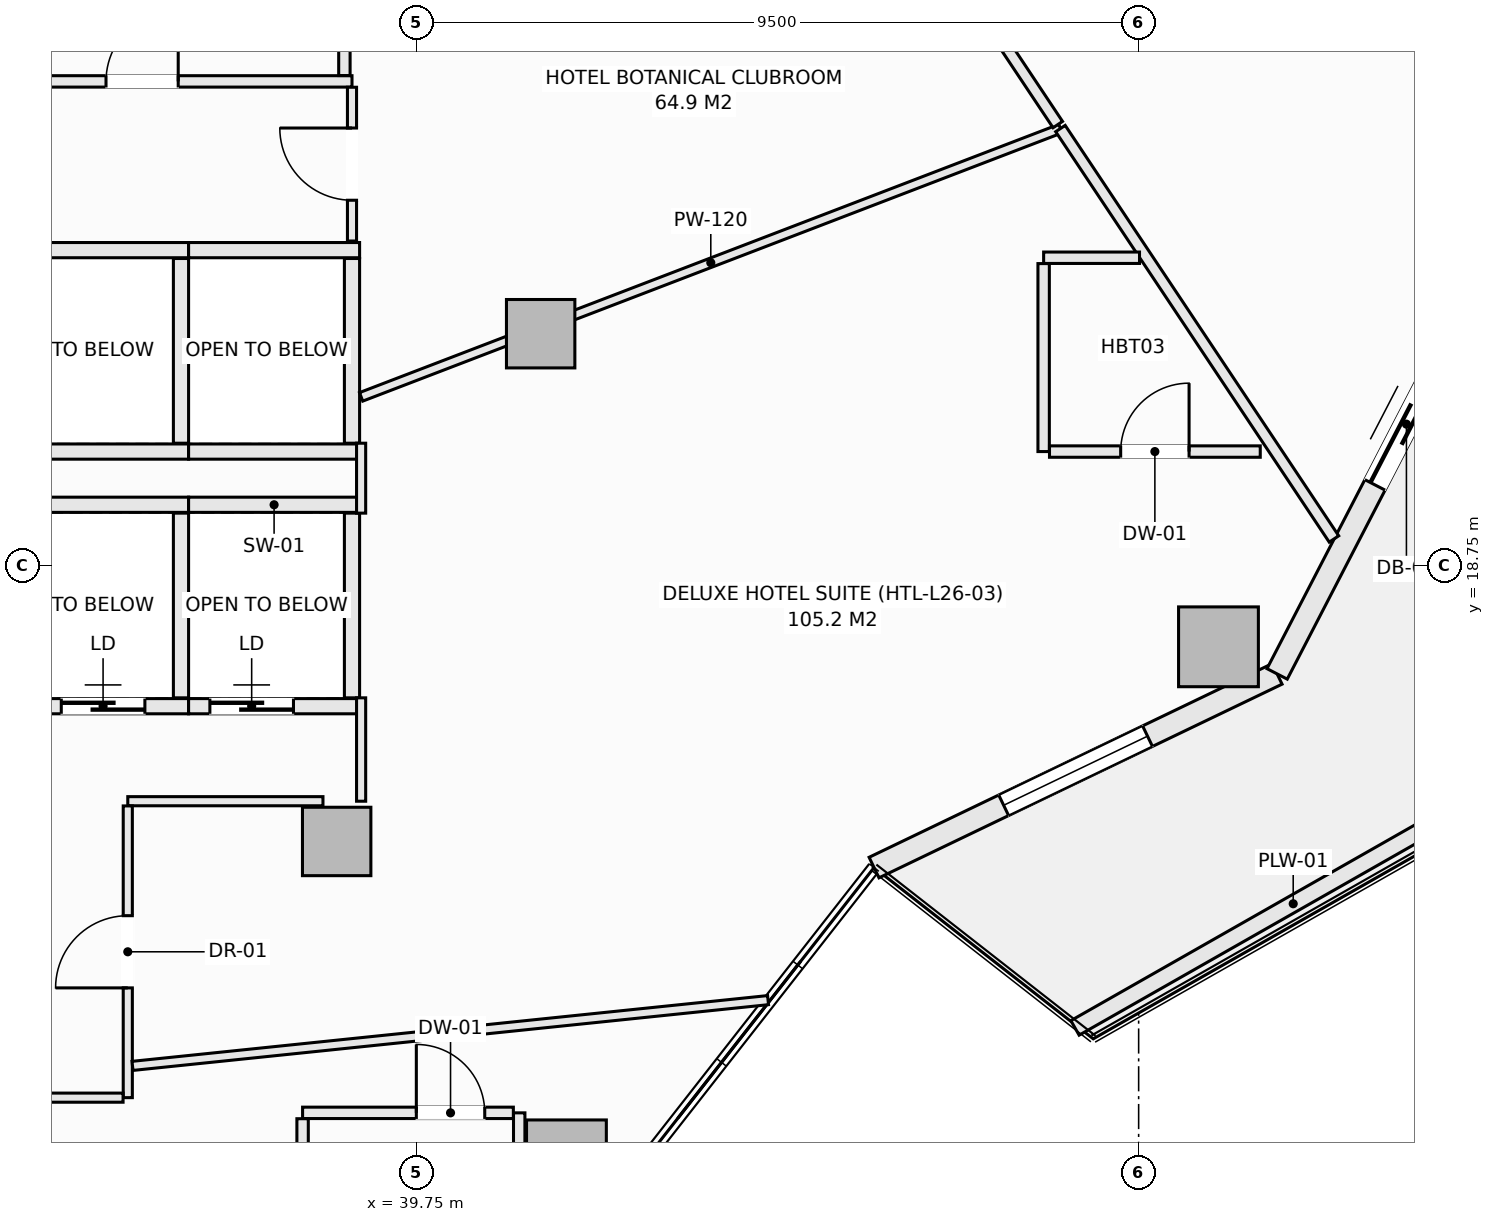
"""IFC4 building model, lengths in metres.
Left out: names, types, materials, properties, quantities, classifications, styles, units other than length and angle.
Written with IfcOpenShell. Run it as: python <this file> out.ifc"""

import sys

from ifc_helpers import new_model, si_unit, direction, frame, frame_2d, origin, origin_2d, place, context, subcontext, project, spatial, rectangle, extrude, element, fill, save


model = new_model("IFC4")
c1 = context("Model", 3, precision=1e-05, world=origin(), true_north=direction((0.0, 1.0)))
c2 = subcontext(c1, "Body", "Model", "MODEL_VIEW")
j1 = project(units=[si_unit("LENGTHUNIT", "METRE"), si_unit("PLANEANGLEUNIT", "RADIAN")], contexts=[c1])
p1 = place(None, origin())
s1 = spatial("IfcSite", under=j1, at=p1, CompositionType="ELEMENT")
p2 = place(p1, origin())
s2 = spatial("IfcBuilding", under=s1, at=p2, CompositionType="ELEMENT")
p3 = place(p2, frame((0.0, 0.0, 108.7)))
s3 = spatial("IfcBuildingStorey", under=s2, at=p3, CompositionType="ELEMENT", Elevation=108.7)
for number, where, z_axis, x_axis in (
    (1, (41.721, 10.932, -0.27), (0.0, 0.0, 1.0), (1.0, 0.0, 0.0)),
    (2, (50.3, 17.681, -0.27), (0.0, 0.0, 1.0), (1.0, 0.0, 0.0)),
):
    element("IfcColumn", number, at=place(p3, frame(where, z_axis=z_axis, x_axis=x_axis)), inside=s3, PredefinedType="COLUMN", context=c2, shape_type="SweptSolid", body=[
        extrude(rectangle(XDim=1.05, YDim=1.05, at=origin_2d()), origin(), (0.0, 0.0, 1.0), 3.4),
    ])
for number, where, z_axis, x_axis in (
    (3, (38.698, 15.121, -0.27), (0.0, 0.0, 1.0), (1.0, 0.0, 0.0)),
    (4, (41.382, 21.801, -0.27), (0.0, 0.0, 1.0), (1.0, 0.0, 0.0)),
):
    element("IfcColumn", number, at=place(p3, frame(where, z_axis=z_axis, x_axis=x_axis)), inside=s3, PredefinedType="COLUMN", context=c2, shape_type="SweptSolid", body=[
        extrude(rectangle(XDim=0.9, YDim=0.9, at=origin_2d()), origin(), (0.0, 0.0, 1.0), 3.4),
    ])
p4 = place(p3, frame((45.769, 14.777, 0.0), z_axis=(0.0, 0.0, 1.0), x_axis=(0.901370184739, 0.433049408339, 0.0)))
e5 = element("IfcWall", 5, at=p4, inside=s3, PredefinedType="SOLIDWALL", context=c2, shape_type="SweptSolid", body=[
    extrude(rectangle(XDim=5.884, YDim=0.3, at=frame_2d((2.942, 0.0))), origin(), (0.0, 0.0, 1.0), 2.653),
])
p5 = place(p4, frame((1.892, 0.0, 0.74)))
e6 = element("IfcOpeningElement", 6, at=p5, cuts=e5, PredefinedType="OPENING", context=c2, shape_type="SweptSolid", body=[
    extrude(rectangle(XDim=2.1, YDim=1.7, at=frame_2d((1.05, 0.85))), frame((0.0, 0.16, 0.0), z_axis=(0.0, -1.0, 0.0), x_axis=(1.0, 0.0, 0.0)), (0.0, 0.0, 1.0), 0.32),
])
p6 = place(p3, frame((51.072, 17.325, 0.0), z_axis=(0.0, 0.0, 1.0), x_axis=(0.459767899643, 0.888039119892, 0.0)))
e7 = element("IfcWall", 7, at=p6, inside=s3, PredefinedType="SOLIDWALL", context=c2, shape_type="SweptSolid", body=[
    extrude(rectangle(XDim=5.255, YDim=0.3, at=frame_2d((2.628, 0.0))), origin(), (0.0, 0.0, 1.0), 2.653),
])
p7 = place(p6, frame((2.8, 0.0, 0.0)))
e8 = element("IfcOpeningElement", 8, at=p7, cuts=e7, PredefinedType="OPENING", context=c2, shape_type="SweptSolid", body=[
    extrude(rectangle(XDim=1.8, YDim=2.25, at=frame_2d((0.9, 1.125))), frame((0.0, 0.16, 0.0), z_axis=(0.0, -1.0, 0.0), x_axis=(1.0, 0.0, 0.0)), (0.0, 0.0, 1.0), 0.32),
])
p8 = place(p3, frame((48.413, 12.668, 0.0), z_axis=(0.0, 0.0, 1.0), x_axis=(0.869187658335, 0.494482370361, 0.0)))
e9 = element("IfcWall", 9, at=p8, inside=s3, PredefinedType="PARAPET", context=c2, shape_type="SweptSolid", body=[
    extrude(rectangle(XDim=6.606, YDim=0.22, at=frame_2d((3.303, 0.0))), origin(), (0.0, 0.0, 1.0), 0.52),
])
p9 = place(p3, frame((34.5, 19.55, 0.0), z_axis=(0.0, 0.0, 1.0), x_axis=(1.0, 0.0, 0.0)))
e10 = element("IfcWall", 10, at=p9, inside=s3, PredefinedType="SOLIDWALL", context=c2, shape_type="SweptSolid", body=[
    extrude(rectangle(XDim=2.25, YDim=0.2, at=frame_2d((1.125, 0.0))), origin(), (0.0, 0.0, 1.0), 3.13),
])
p10 = place(p3, frame((34.5, 16.9, 0.0), z_axis=(0.0, 0.0, 1.0), x_axis=(1.0, 0.0, 0.0)))
e11 = element("IfcWall", 11, at=p10, inside=s3, PredefinedType="SOLIDWALL", context=c2, shape_type="SweptSolid", body=[
    extrude(rectangle(XDim=2.25, YDim=0.2, at=frame_2d((1.125, 0.0))), origin(), (0.0, 0.0, 1.0), 3.13),
])
p11 = place(p10, frame((0.575, 0.0, 0.0)))
e12 = element("IfcOpeningElement", 12, at=p11, cuts=e11, PredefinedType="OPENING", context=c2, shape_type="SweptSolid", body=[
    extrude(rectangle(XDim=1.1, YDim=2.2, at=frame_2d((0.55, 1.1))), frame((0.0, 0.11, 0.0), z_axis=(0.0, -1.0, 0.0), x_axis=(1.0, 0.0, 0.0)), (0.0, 0.0, 1.0), 0.22),
])
p12 = place(p3, frame((36.65, 17.01, 0.0), z_axis=(0.0, 0.0, 1.0), x_axis=(0.0, 1.0, 0.0)))
e13 = element("IfcWall", 13, at=p12, inside=s3, PredefinedType="SOLIDWALL", context=c2, shape_type="SweptSolid", body=[
    extrude(rectangle(XDim=2.43, YDim=0.2, at=frame_2d((1.215, 0.0))), origin(), (0.0, 0.0, 1.0), 3.13),
])
p13 = place(p3, frame((36.75, 19.55, 0.0), z_axis=(0.0, 0.0, 1.0), x_axis=(1.0, 0.0, 0.0)))
e14 = element("IfcWall", 14, at=p13, inside=s3, PredefinedType="SOLIDWALL", context=c2, shape_type="SweptSolid", body=[
    extrude(rectangle(XDim=2.25, YDim=0.2, at=frame_2d((1.125, 0.0))), origin(), (0.0, 0.0, 1.0), 3.13),
])
p14 = place(p3, frame((36.75, 16.9, 0.0), z_axis=(0.0, 0.0, 1.0), x_axis=(1.0, 0.0, 0.0)))
e15 = element("IfcWall", 15, at=p14, inside=s3, PredefinedType="SOLIDWALL", context=c2, shape_type="SweptSolid", body=[
    extrude(rectangle(XDim=2.25, YDim=0.2, at=frame_2d((1.125, 0.0))), origin(), (0.0, 0.0, 1.0), 3.13),
])
p15 = place(p14, frame((0.28, 0.0, 0.0)))
e16 = element("IfcOpeningElement", 16, at=p15, cuts=e15, PredefinedType="OPENING", context=c2, shape_type="SweptSolid", body=[
    extrude(rectangle(XDim=1.1, YDim=2.2, at=frame_2d((0.55, 1.1))), frame((0.0, 0.11, 0.0), z_axis=(0.0, -1.0, 0.0), x_axis=(1.0, 0.0, 0.0)), (0.0, 0.0, 1.0), 0.22),
])
p16 = place(p3, frame((38.9, 17.01, 0.0), z_axis=(0.0, 0.0, 1.0), x_axis=(0.0, 1.0, 0.0)))
e17 = element("IfcWall", 17, at=p16, inside=s3, PredefinedType="SOLIDWALL", context=c2, shape_type="SweptSolid", body=[
    extrude(rectangle(XDim=2.43, YDim=0.2, at=frame_2d((1.215, 0.0))), origin(), (0.0, 0.0, 1.0), 3.13),
])
for number, where, z_axis, x_axis in (
    (18, (34.5, 22.9, 0.0), (0.0, 0.0, 1.0), (1.0, 0.0, 0.0)),
    (19, (34.5, 20.25, 0.0), (0.0, 0.0, 1.0), (1.0, 0.0, 0.0)),
):
    element("IfcWall", number, at=place(p3, frame(where, z_axis=z_axis, x_axis=x_axis)), inside=s3, PredefinedType="SOLIDWALL", context=c2, shape_type="SweptSolid", body=[
        extrude(rectangle(XDim=2.25, YDim=0.2, at=frame_2d((1.125, 0.0))), origin(), (0.0, 0.0, 1.0), 3.13),
    ])
p17 = place(p3, frame((36.65, 20.36, 0.0), z_axis=(0.0, 0.0, 1.0), x_axis=(0.0, 1.0, 0.0)))
e20 = element("IfcWall", 20, at=p17, inside=s3, PredefinedType="SOLIDWALL", context=c2, shape_type="SweptSolid", body=[
    extrude(rectangle(XDim=2.43, YDim=0.2, at=frame_2d((1.215, 0.0))), origin(), (0.0, 0.0, 1.0), 3.13),
])
for number, where, z_axis, x_axis in (
    (21, (36.75, 22.9, 0.0), (0.0, 0.0, 1.0), (1.0, 0.0, 0.0)),
    (22, (36.75, 20.25, 0.0), (0.0, 0.0, 1.0), (1.0, 0.0, 0.0)),
):
    element("IfcWall", number, at=place(p3, frame(where, z_axis=z_axis, x_axis=x_axis)), inside=s3, PredefinedType="SOLIDWALL", context=c2, shape_type="SweptSolid", body=[
        extrude(rectangle(XDim=2.25, YDim=0.2, at=frame_2d((1.125, 0.0))), origin(), (0.0, 0.0, 1.0), 3.13),
    ])
p18 = place(p3, frame((38.9, 20.36, 0.0), z_axis=(0.0, 0.0, 1.0), x_axis=(0.0, 1.0, 0.0)))
e23 = element("IfcWall", 23, at=p18, inside=s3, PredefinedType="SOLIDWALL", context=c2, shape_type="SweptSolid", body=[
    extrude(rectangle(XDim=2.43, YDim=0.2, at=frame_2d((1.215, 0.0))), origin(), (0.0, 0.0, 1.0), 3.13),
])
p19 = place(p3, frame((33.377, 25.12, 0.0), z_axis=(0.0, 0.0, 1.0), x_axis=(1.0, 0.0, 0.0)))
e24 = element("IfcWall", 24, at=p19, inside=s3, PredefinedType="PARTITIONING", context=c2, shape_type="SweptSolid", body=[
    extrude(rectangle(XDim=5.523, YDim=0.15, at=frame_2d((2.761, 0.0))), origin(), (0.0, 0.0, 1.0), 3.13),
])
p20 = place(p19, frame((2.287, 0.0, 0.0)))
e25 = element("IfcOpeningElement", 25, at=p20, cuts=e24, PredefinedType="OPENING", context=c2, shape_type="SweptSolid", body=[
    extrude(rectangle(XDim=0.95, YDim=2.1, at=frame_2d((0.475, 1.05))), frame((0.0, 0.085, 0.0), z_axis=(0.0, -1.0, 0.0), x_axis=(1.0, 0.0, 0.0)), (0.0, 0.0, 1.0), 0.17),
])
p21 = place(p3, frame((38.8, 25.197, 0.0), z_axis=(0.0, 0.0, 1.0), x_axis=(0.0, 1.0, 0.0)))
e26 = element("IfcWall", 26, at=p21, inside=s3, PredefinedType="PARTITIONING", context=c2, shape_type="SweptSolid", body=[
    extrude(rectangle(XDim=1.946, YDim=0.15, at=frame_2d((0.973, 0.0))), origin(), (0.0, 0.0, 1.0), 3.13),
])
p22 = place(p3, frame((39.02, 15.65, 0.0), z_axis=(0.0, 0.0, 1.0), x_axis=(0.0, 1.0, 0.0)))
e27 = element("IfcWall", 27, at=p22, inside=s3, PredefinedType="PARTITIONING", context=c2, shape_type="SweptSolid", body=[
    extrude(rectangle(XDim=1.36, YDim=0.12, at=frame_2d((0.68, 0.0))), origin(), (0.0, 0.0, 1.0), 2.505),
])
p23 = place(p3, frame((39.02, 19.44, 0.0), z_axis=(0.0, 0.0, 1.0), x_axis=(0.0, 1.0, 0.0)))
e28 = element("IfcWall", 28, at=p23, inside=s3, PredefinedType="PARTITIONING", context=c2, shape_type="SweptSolid", body=[
    extrude(rectangle(XDim=0.92, YDim=0.12, at=frame_2d((0.46, 0.0))), origin(), (0.0, 0.0, 1.0), 3.13),
])
p24 = place(p3, frame((35.95, 15.65, 0.0), z_axis=(0.0, 0.0, 1.0), x_axis=(1.0, 0.0, 0.0)))
e29 = element("IfcWall", 29, at=p24, inside=s3, PredefinedType="PARTITIONING", context=c2, shape_type="SweptSolid", body=[
    extrude(rectangle(XDim=2.568, YDim=0.12, at=frame_2d((1.284, 0.0))), origin(), (0.0, 0.0, 1.0), 3.13),
])
p25 = place(p3, frame((35.95, 11.75, 0.0), z_axis=(0.0, 0.0, 1.0), x_axis=(0.0, 1.0, 0.0)))
e30 = element("IfcWall", 30, at=p25, inside=s3, PredefinedType="PARTITIONING", context=c2, shape_type="SweptSolid", body=[
    extrude(rectangle(XDim=3.838, YDim=0.12, at=frame_2d((1.919, 0.0))), origin(), (0.0, 0.0, 1.0), 3.13),
])
p26 = place(p25, frame((1.444, 0.0, 0.0)))
e31 = element("IfcOpeningElement", 31, at=p26, cuts=e30, PredefinedType="OPENING", context=c2, shape_type="SweptSolid", body=[
    extrude(rectangle(XDim=0.95, YDim=2.1, at=frame_2d((0.475, 1.05))), frame((0.0, 0.07, 0.0), z_axis=(0.0, -1.0, 0.0), x_axis=(1.0, 0.0, 0.0)), (0.0, 0.0, 1.0), 0.14),
])
p27 = place(p3, frame((27.212, 11.75, 0.0), z_axis=(0.0, 0.0, 1.0), x_axis=(1.0, 0.0, 0.0)))
e32 = element("IfcWall", 32, at=p27, inside=s3, PredefinedType="PARTITIONING", context=c2, shape_type="SweptSolid", body=[
    extrude(rectangle(XDim=8.676, YDim=0.12, at=frame_2d((4.338, 0.0))), origin(), (0.0, 0.0, 1.0), 3.13),
])
p28 = place(p27, frame((4.993, 0.0, 0.0)))
e33 = element("IfcOpeningElement", 33, at=p28, cuts=e32, PredefinedType="OPENING", context=c2, shape_type="SweptSolid", body=[
    extrude(rectangle(XDim=0.95, YDim=2.1, at=frame_2d((0.475, 1.05))), frame((0.0, 0.07, 0.0), z_axis=(0.0, -1.0, 0.0), x_axis=(1.0, 0.0, 0.0)), (0.0, 0.0, 1.0), 0.14),
])
p29 = place(p3, frame((38.9, 23.02, 0.0), z_axis=(0.0, 0.0, 1.0), x_axis=(0.0, 1.0, 0.0)))
e34 = element("IfcWall", 34, at=p29, inside=s3, PredefinedType="PARTITIONING", context=c2, shape_type="SweptSolid", body=[
    extrude(rectangle(XDim=2.023, YDim=0.12, at=frame_2d((1.011, 0.0))), origin(), (0.0, 0.0, 1.0), 3.13),
])
p30 = place(p29, frame((0.537, 0.0, 0.0)))
e35 = element("IfcOpeningElement", 35, at=p30, cuts=e34, PredefinedType="OPENING", context=c2, shape_type="SweptSolid", body=[
    extrude(rectangle(XDim=0.95, YDim=2.1, at=frame_2d((0.475, 1.05))), frame((0.0, 0.07, 0.0), z_axis=(0.0, -1.0, 0.0), x_axis=(1.0, 0.0, 0.0)), (0.0, 0.0, 1.0), 0.14),
])
p31 = place(p3, frame((39.02, 20.97, 0.0), z_axis=(0.0, 0.0, 1.0), x_axis=(0.933683590648, 0.358099082035, 0.0)))
e36 = element("IfcWall", 36, at=p31, inside=s3, PredefinedType="PARTITIONING", context=c2, shape_type="SweptSolid", body=[
    extrude(rectangle(XDim=9.855, YDim=0.12, at=frame_2d((4.927, 0.0))), origin(), (0.0, 0.0, 1.0), 2.812),
])
p32 = place(p3, frame((36.012, 12.168, 0.0), z_axis=(0.0, 0.0, 1.0), x_axis=(0.994692716247, 0.102890233962, 0.0)))
e37 = element("IfcWall", 37, at=p32, inside=s3, PredefinedType="PARTITIONING", context=c2, shape_type="SweptSolid", body=[
    extrude(rectangle(XDim=8.407, YDim=0.12, at=frame_2d((4.204, 0.0))), origin(), (0.0, 0.0, 1.0), 2.653),
])
p33 = place(p3, frame((41.1, 10.032, 0.0), z_axis=(0.0, 0.0, 1.0), x_axis=(0.0, 1.0, 0.0)))
e38 = element("IfcWall", 38, at=p33, inside=s3, PredefinedType="PARTITIONING", context=c2, shape_type="SweptSolid", body=[
    extrude(rectangle(XDim=1.518, YDim=0.15, at=frame_2d((0.759, 0.0))), origin(), (0.0, 0.0, 1.0), 2.505),
])
p34 = place(p3, frame((38.25, 11.55, 0.0), z_axis=(0.0, 0.0, 1.0), x_axis=(1.0, 0.0, 0.0)))
e39 = element("IfcWall", 39, at=p34, inside=s3, PredefinedType="PARTITIONING", context=c2, shape_type="SweptSolid", body=[
    extrude(rectangle(XDim=2.773, YDim=0.15, at=frame_2d((1.386, 0.0))), origin(), (0.0, 0.0, 1.0), 3.13),
])
p35 = place(p34, frame((1.497, 0.0, 0.0)))
e40 = element("IfcOpeningElement", 40, at=p35, cuts=e39, PredefinedType="OPENING", context=c2, shape_type="SweptSolid", body=[
    extrude(rectangle(XDim=0.9, YDim=2.1, at=frame_2d((0.45, 1.05))), frame((0.0, 0.085, 0.0), z_axis=(0.0, -1.0, 0.0), x_axis=(1.0, 0.0, 0.0)), (0.0, 0.0, 1.0), 0.17),
])
p36 = place(p3, frame((38.25, 9.087, 0.0), z_axis=(0.0, 0.0, 1.0), x_axis=(0.0, 1.0, 0.0)))
e41 = element("IfcWall", 41, at=p36, inside=s3, PredefinedType="PARTITIONING", context=c2, shape_type="SweptSolid", body=[
    extrude(rectangle(XDim=2.385, YDim=0.15, at=frame_2d((1.193, 0.0))), origin(), (0.0, 0.0, 1.0), 3.13),
])
p37 = place(p3, frame((37.565, 40.488, 0.0), z_axis=(0.0, 0.0, 1.0), x_axis=(0.554585457046, -0.832126775698, 0.0)))
e42 = element("IfcWall", 42, at=p37, inside=s3, PredefinedType="PARTITIONING", context=c2, shape_type="SweptSolid", body=[
    extrude(rectangle(XDim=19.151, YDim=0.15, at=frame_2d((9.575, 0.0))), origin(), (0.0, 0.0, 1.0), 3.13),
])
p38 = place(p3, frame((48.221, 24.5, 0.0), z_axis=(0.0, 0.0, 1.0), x_axis=(0.554587324832, -0.832125530876, 0.0)))
e43 = element("IfcWall", 43, at=p38, inside=s3, PredefinedType="PARTITIONING", context=c2, shape_type="SweptSolid", body=[
    extrude(rectangle(XDim=6.489, YDim=0.15, at=frame_2d((3.245, 0.0))), origin(), (0.0, 0.0, 1.0), 3.13),
])
p39 = place(p3, frame((48.0, 22.8, 0.0), z_axis=(0.0, 0.0, 1.0), x_axis=(1.0, 0.0, 0.0)))
e44 = element("IfcWall", 44, at=p39, inside=s3, PredefinedType="PARTITIONING", context=c2, shape_type="SweptSolid", body=[
    extrude(rectangle(XDim=1.261, YDim=0.15, at=frame_2d((0.631, 0.0))), origin(), (0.0, 0.0, 1.0), 2.812),
])
p40 = place(p3, frame((48.0, 20.25, 0.0), z_axis=(0.0, 0.0, 1.0), x_axis=(0.0, 1.0, 0.0)))
e45 = element("IfcWall", 45, at=p40, inside=s3, PredefinedType="PARTITIONING", context=c2, shape_type="SweptSolid", body=[
    extrude(rectangle(XDim=2.473, YDim=0.15, at=frame_2d((1.236, 0.0))), origin(), (0.0, 0.0, 1.0), 3.13),
])
p41 = place(p3, frame((48.077, 20.25, 0.0), z_axis=(0.0, 0.0, 1.0), x_axis=(1.0, 0.0, 0.0)))
e46 = element("IfcWall", 46, at=p41, inside=s3, PredefinedType="PARTITIONING", context=c2, shape_type="SweptSolid", body=[
    extrude(rectangle(XDim=2.773, YDim=0.15, at=frame_2d((1.387, 0.0))), origin(), (0.0, 0.0, 1.0), 3.13),
])
p42 = place(p41, frame((0.937, 0.0, 0.0)))
e47 = element("IfcOpeningElement", 47, at=p42, cuts=e46, PredefinedType="OPENING", context=c2, shape_type="SweptSolid", body=[
    extrude(rectangle(XDim=0.9, YDim=2.1, at=frame_2d((0.45, 1.05))), frame((0.0, 0.085, 0.0), z_axis=(0.0, -1.0, 0.0), x_axis=(1.0, 0.0, 0.0)), (0.0, 0.0, 1.0), 0.17),
])
p43 = place(p5, origin())
e48 = element("IfcWindow", 48, at=p43, inside=s3, PartitioningType="SINGLE_PANEL", PredefinedType="WINDOW", context=c2, shape_type="SweptSolid", body=[
    extrude(rectangle(XDim=2.1, YDim=1.7, at=frame_2d((1.05, 0.85))), frame((0.0, 0.03, 0.0), z_axis=(0.0, -1.0, 0.0), x_axis=(1.0, 0.0, 0.0)), (0.0, 0.0, 1.0), 0.06),
])
fill(e6, e48)
p44 = place(p7, frame((1.8, 0.0, 0.0), z_axis=(0.0, 0.0, 1.0), x_axis=(-1.0, 0.0, 0.0)))
e49 = element("IfcDoor", 49, at=p44, inside=s3, OperationType="SLIDING_TO_LEFT", PredefinedType="DOOR", context=c2, shape_type="SweptSolid", body=[
    extrude(rectangle(XDim=1.8, YDim=2.25, at=frame_2d((0.9, 1.125))), frame((0.0, 0.025, 0.0), z_axis=(0.0, -1.0, 0.0), x_axis=(1.0, 0.0, 0.0)), (0.0, 0.0, 1.0), 0.05),
])
fill(e8, e49)
p45 = place(p11, origin())
e50 = element("IfcDoor", 50, at=p45, inside=s3, OperationType="SLIDING_TO_LEFT", PredefinedType="DOOR", context=c2, shape_type="SweptSolid", body=[
    extrude(rectangle(XDim=1.1, YDim=2.2, at=frame_2d((0.55, 1.1))), frame((0.0, 0.025, 0.0), z_axis=(0.0, -1.0, 0.0), x_axis=(1.0, 0.0, 0.0)), (0.0, 0.0, 1.0), 0.05),
])
fill(e12, e50)
p46 = place(p15, origin())
e51 = element("IfcDoor", 51, at=p46, inside=s3, OperationType="SLIDING_TO_LEFT", PredefinedType="DOOR", context=c2, shape_type="SweptSolid", body=[
    extrude(rectangle(XDim=1.1, YDim=2.2, at=frame_2d((0.55, 1.1))), frame((0.0, 0.025, 0.0), z_axis=(0.0, -1.0, 0.0), x_axis=(1.0, 0.0, 0.0)), (0.0, 0.0, 1.0), 0.05),
])
fill(e16, e51)
p47 = place(p20, origin())
e52 = element("IfcDoor", 52, at=p47, inside=s3, OperationType="SINGLE_SWING_RIGHT", PredefinedType="DOOR", context=c2, shape_type="SweptSolid", body=[
    extrude(rectangle(XDim=0.95, YDim=2.1, at=frame_2d((0.475, 1.05))), frame((0.0, 0.025, 0.0), z_axis=(0.0, -1.0, 0.0), x_axis=(1.0, 0.0, 0.0)), (0.0, 0.0, 1.0), 0.05),
])
fill(e25, e52)
p48 = place(p26, origin())
e53 = element("IfcDoor", 53, at=p48, inside=s3, OperationType="SINGLE_SWING_LEFT", PredefinedType="DOOR", context=c2, shape_type="SweptSolid", body=[
    extrude(rectangle(XDim=0.95, YDim=2.1, at=frame_2d((0.475, 1.05))), frame((0.0, 0.025, 0.0), z_axis=(0.0, -1.0, 0.0), x_axis=(1.0, 0.0, 0.0)), (0.0, 0.0, 1.0), 0.05),
])
fill(e31, e53)
p49 = place(p30, origin())
e54 = element("IfcDoor", 54, at=p49, inside=s3, OperationType="SINGLE_SWING_RIGHT", PredefinedType="DOOR", context=c2, shape_type="SweptSolid", body=[
    extrude(rectangle(XDim=0.95, YDim=2.1, at=frame_2d((0.475, 1.05))), frame((0.0, 0.025, 0.0), z_axis=(0.0, -1.0, 0.0), x_axis=(1.0, 0.0, 0.0)), (0.0, 0.0, 1.0), 0.05),
])
fill(e35, e54)
p50 = place(p35, origin())
e55 = element("IfcDoor", 55, at=p50, inside=s3, OperationType="SINGLE_SWING_LEFT", PredefinedType="DOOR", context=c2, shape_type="SweptSolid", body=[
    extrude(rectangle(XDim=0.9, YDim=2.1, at=frame_2d((0.45, 1.05))), frame((0.0, 0.025, 0.0), z_axis=(0.0, -1.0, 0.0), x_axis=(1.0, 0.0, 0.0)), (0.0, 0.0, 1.0), 0.05),
])
fill(e40, e55)
p51 = place(p42, origin())
e56 = element("IfcDoor", 56, at=p51, inside=s3, OperationType="SINGLE_SWING_RIGHT", PredefinedType="DOOR", context=c2, shape_type="SweptSolid", body=[
    extrude(rectangle(XDim=0.9, YDim=2.1, at=frame_2d((0.45, 1.05))), frame((0.0, 0.025, 0.0), z_axis=(0.0, -1.0, 0.0), x_axis=(1.0, 0.0, 0.0)), (0.0, 0.0, 1.0), 0.05),
])
fill(e47, e56)
save(model, sys.argv[1])
